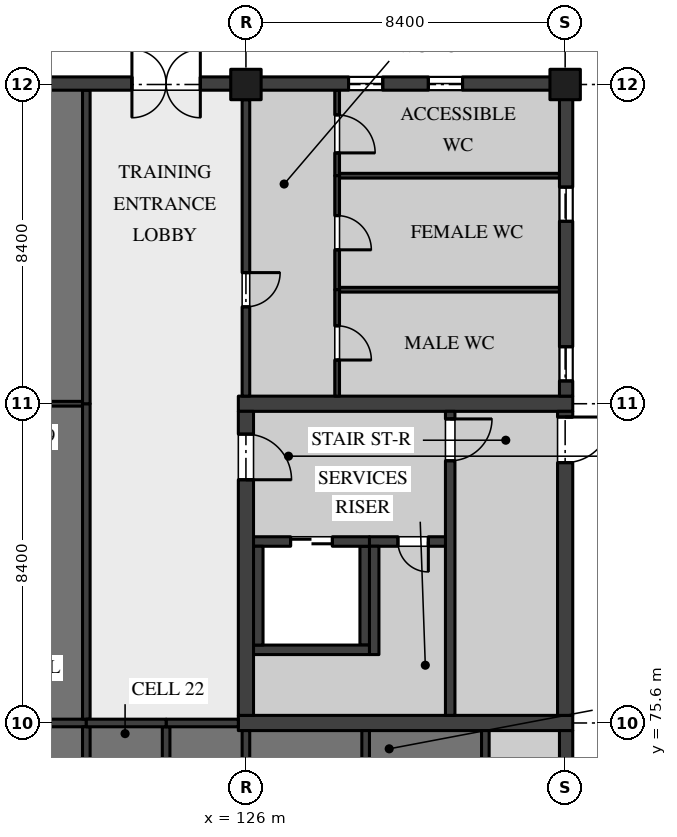
"""IFC4 building model, lengths in metres.
Left out: names, types, materials, properties, quantities, classifications, styles, units other than length and angle.
Written with IfcOpenShell. Run it as: python <this file> out.ifc"""

import sys

from ifc_helpers import new_model, si_unit, direction, frame, frame_2d, origin, origin_2d, place, context, subcontext, project, spatial, rectangle, extrude, element, fill, save


model = new_model("IFC4")
c1 = context("Model", 3, precision=1e-05, world=origin(), true_north=direction((0.0, 1.0)))
c2 = subcontext(c1, "Body", "Model", "MODEL_VIEW")
j1 = project(units=[si_unit("LENGTHUNIT", "METRE"), si_unit("PLANEANGLEUNIT", "RADIAN")], contexts=[c1])
p1 = place(None, origin())
s1 = spatial("IfcSite", under=j1, at=p1, CompositionType="ELEMENT")
p2 = place(p1, origin())
s2 = spatial("IfcBuilding", under=s1, at=p2, CompositionType="ELEMENT")
p3 = place(p2, origin())
s3 = spatial("IfcBuildingStorey", under=s2, at=p3, CompositionType="ELEMENT", Elevation=0.0)
for number, where, z_axis, x_axis in (
    (1, (126.0, 92.4, 0.0), (0.0, 0.0, 1.0), (1.0, 0.0, 0.0)),
    (2, (134.4, 92.4, 0.0), (0.0, 0.0, 1.0), (1.0, 0.0, 0.0)),
):
    element("IfcColumn", number, at=place(p3, frame(where, z_axis=z_axis, x_axis=x_axis)), inside=s3, PredefinedType="COLUMN", context=c2, shape_type="SweptSolid", body=[
        extrude(rectangle(XDim=0.8, YDim=0.8, at=origin_2d()), origin(), (0.0, 0.0, 1.0), 5.05),
    ])
for number, where, z_axis, x_axis in (
    (3, (125.8, 75.6, 0.0), (0.0, 0.0, 1.0), (1.0, 0.0, 0.0)),
    (4, (125.8, 84.0, 0.0), (0.0, 0.0, 1.0), (1.0, 0.0, 0.0)),
):
    element("IfcWall", number, at=place(p3, frame(where, z_axis=z_axis, x_axis=x_axis)), inside=s3, PredefinedType="SHEAR", context=c2, shape_type="SweptSolid", body=[
        extrude(rectangle(XDim=8.8, YDim=0.4, at=frame_2d((4.4, 0.0))), origin(), (0.0, 0.0, 1.0), 5.05),
    ])
p4 = place(p3, frame((126.0, 75.8, 0.0), z_axis=(0.0, 0.0, 1.0), x_axis=(0.0, 1.0, 0.0)))
e5 = element("IfcWall", 5, at=p4, inside=s3, PredefinedType="SHEAR", context=c2, shape_type="SweptSolid", body=[
    extrude(rectangle(XDim=8.0, YDim=0.4, at=frame_2d((4.0, 0.0))), origin(), (0.0, 0.0, 1.0), 5.05),
])
p5 = place(p4, frame((6.2, 0.0, 0.0)))
e6 = element("IfcOpeningElement", 6, at=p5, cuts=e5, PredefinedType="OPENING", context=c2, shape_type="SweptSolid", body=[
    extrude(rectangle(XDim=1.2, YDim=2.1, at=frame_2d((0.6, 1.05))), frame((0.0, 0.21, 0.0), z_axis=(0.0, -1.0, 0.0), x_axis=(1.0, 0.0, 0.0)), (0.0, 0.0, 1.0), 0.42),
])
p6 = place(p3, frame((134.4, 75.8, 0.0), z_axis=(0.0, 0.0, 1.0), x_axis=(0.0, 1.0, 0.0)))
e7 = element("IfcWall", 7, at=p6, inside=s3, PredefinedType="SHEAR", context=c2, shape_type="SweptSolid", body=[
    extrude(rectangle(XDim=8.0, YDim=0.4, at=frame_2d((4.0, 0.0))), origin(), (0.0, 0.0, 1.0), 5.05),
])
p7 = place(p6, frame((6.65, 0.0, 0.0)))
e8 = element("IfcOpeningElement", 8, at=p7, cuts=e7, PredefinedType="OPENING", context=c2, shape_type="SweptSolid", body=[
    extrude(rectangle(XDim=1.2, YDim=2.1, at=frame_2d((0.6, 1.05))), frame((0.0, 0.21, 0.0), z_axis=(0.0, -1.0, 0.0), x_axis=(1.0, 0.0, 0.0)), (0.0, 0.0, 1.0), 0.42),
])
p8 = place(p3, frame((131.375, 83.8, 0.0), z_axis=(0.0, 0.0, 1.0), x_axis=(0.0, -1.0, 0.0)))
e9 = element("IfcWall", 9, at=p8, inside=s3, PredefinedType="SOLIDWALL", context=c2, shape_type="SweptSolid", body=[
    extrude(rectangle(XDim=8.0, YDim=0.25, at=frame_2d((4.0, 0.0))), origin(), (0.0, 0.0, 1.0), 5.05),
])
p9 = place(p8, frame((0.2, 0.0, 0.0)))
e10 = element("IfcOpeningElement", 10, at=p9, cuts=e9, PredefinedType="OPENING", context=c2, shape_type="SweptSolid", body=[
    extrude(rectangle(XDim=1.1, YDim=2.1, at=frame_2d((0.55, 1.05))), frame((0.0, 0.135, 0.0), z_axis=(0.0, -1.0, 0.0), x_axis=(1.0, 0.0, 0.0)), (0.0, 0.0, 1.0), 0.27),
])
p10 = place(p3, frame((131.25, 80.375, 0.0), z_axis=(0.0, 0.0, 1.0), x_axis=(-1.0, 0.0, 0.0)))
e11 = element("IfcWall", 11, at=p10, inside=s3, PredefinedType="SOLIDWALL", context=c2, shape_type="SweptSolid", body=[
    extrude(rectangle(XDim=2.0, YDim=0.25, at=frame_2d((1.0, 0.0))), origin(), (0.0, 0.0, 1.0), 5.05),
])
p11 = place(p10, frame((0.45, 0.0, 0.0)))
e12 = element("IfcOpeningElement", 12, at=p11, cuts=e11, PredefinedType="OPENING", context=c2, shape_type="SweptSolid", body=[
    extrude(rectangle(XDim=0.8, YDim=2.1, at=frame_2d((0.4, 1.05))), frame((0.0, 0.135, 0.0), z_axis=(0.0, -1.0, 0.0), x_axis=(1.0, 0.0, 0.0)), (0.0, 0.0, 1.0), 0.27),
])
p12 = place(p3, frame((129.375, 80.25, 0.0), z_axis=(0.0, 0.0, 1.0), x_axis=(0.0, -1.0, 0.0)))
e13 = element("IfcWall", 13, at=p12, inside=s3, PredefinedType="SOLIDWALL", context=c2, shape_type="SweptSolid", body=[
    extrude(rectangle(XDim=2.85, YDim=0.25, at=frame_2d((1.425, 0.0))), origin(), (0.0, 0.0, 1.0), 5.05),
])
p13 = place(p3, frame((129.125, 77.65, 0.0), z_axis=(0.0, 0.0, 1.0), x_axis=(0.0, 1.0, 0.0)))
e14 = element("IfcWall", 14, at=p13, inside=s3, PredefinedType="SOLIDWALL", context=c2, shape_type="SweptSolid", body=[
    extrude(rectangle(XDim=2.6, YDim=0.25, at=frame_2d((1.3, 0.0))), origin(), (0.0, 0.0, 1.0), 5.05),
])
p14 = place(p3, frame((126.2, 80.375, 0.0), z_axis=(0.0, 0.0, 1.0), x_axis=(1.0, 0.0, 0.0)))
e15 = element("IfcWall", 15, at=p14, inside=s3, PredefinedType="SOLIDWALL", context=c2, shape_type="SweptSolid", body=[
    extrude(rectangle(XDim=3.05, YDim=0.25, at=frame_2d((1.525, 0.0))), origin(), (0.0, 0.0, 1.0), 5.05),
])
p15 = place(p14, frame((0.975, 0.0, 0.0)))
e16 = element("IfcOpeningElement", 16, at=p15, cuts=e15, PredefinedType="OPENING", context=c2, shape_type="SweptSolid", body=[
    extrude(rectangle(XDim=1.1, YDim=2.1, at=frame_2d((0.55, 1.05))), frame((0.0, 0.135, 0.0), z_axis=(0.0, -1.0, 0.0), x_axis=(1.0, 0.0, 0.0)), (0.0, 0.0, 1.0), 0.27),
])
p16 = place(p3, frame((126.2, 77.525, 0.0), z_axis=(0.0, 0.0, 1.0), x_axis=(1.0, 0.0, 0.0)))
e17 = element("IfcWall", 17, at=p16, inside=s3, PredefinedType="SOLIDWALL", context=c2, shape_type="SweptSolid", body=[
    extrude(rectangle(XDim=3.05, YDim=0.25, at=frame_2d((1.525, 0.0))), origin(), (0.0, 0.0, 1.0), 5.05),
])
p17 = place(p3, frame((126.325, 77.65, 0.0), z_axis=(0.0, 0.0, 1.0), x_axis=(0.0, 1.0, 0.0)))
e18 = element("IfcWall", 18, at=p17, inside=s3, PredefinedType="SOLIDWALL", context=c2, shape_type="SweptSolid", body=[
    extrude(rectangle(XDim=2.6, YDim=0.25, at=frame_2d((1.3, 0.0))), origin(), (0.0, 0.0, 1.0), 5.05),
])
p18 = place(p3, frame((119.7, 75.6, 0.0), z_axis=(0.0, 0.0, 1.0), x_axis=(1.0, 0.0, 0.0)))
e19 = element("IfcWall", 19, at=p18, inside=s3, PredefinedType="PARTITIONING", context=c2, shape_type="SweptSolid", body=[
    extrude(rectangle(XDim=2.1, YDim=0.2, at=frame_2d((1.05, 0.0))), origin(), (0.0, 0.0, 1.0), 5.05),
])
p19 = place(p3, frame((118.0, 84.0, 0.0), z_axis=(0.0, 0.0, 1.0), x_axis=(1.0, 0.0, 0.0)))
e20 = element("IfcWall", 20, at=p19, inside=s3, PredefinedType="PARTITIONING", context=c2, shape_type="SweptSolid", body=[
    extrude(rectangle(XDim=3.7, YDim=0.125, at=frame_2d((1.85, 0.0))), origin(), (0.0, 0.0, 1.0), 5.05),
])
p20 = place(p3, frame((121.8, 75.7, 0.0), z_axis=(0.0, 0.0, 1.0), x_axis=(0.0, 1.0, 0.0)))
e21 = element("IfcWall", 21, at=p20, inside=s3, PredefinedType="PARTITIONING", context=c2, shape_type="SweptSolid", body=[
    extrude(rectangle(XDim=8.3, YDim=0.2, at=frame_2d((4.15, 0.0))), origin(), (0.0, 0.0, 1.0), 5.05),
])
p21 = place(p3, frame((123.9, 72.4, 0.0), z_axis=(0.0, 0.0, 1.0), x_axis=(0.0, 1.0, 0.0)))
e22 = element("IfcWall", 22, at=p21, inside=s3, PredefinedType="PARTITIONING", context=c2, shape_type="SweptSolid", body=[
    extrude(rectangle(XDim=3.1, YDim=0.2, at=frame_2d((1.55, 0.0))), origin(), (0.0, 0.0, 1.0), 5.05),
])
p22 = place(p3, frame((126.0, 72.4, 0.0), z_axis=(0.0, 0.0, 1.0), x_axis=(0.0, 1.0, 0.0)))
e23 = element("IfcWall", 23, at=p22, inside=s3, PredefinedType="PARTITIONING", context=c2, shape_type="SweptSolid", body=[
    extrude(rectangle(XDim=3.0, YDim=0.2, at=frame_2d((1.5, 0.0))), origin(), (0.0, 0.0, 1.0), 5.05),
])
p23 = place(p3, frame((123.9, 75.6, 0.0), z_axis=(0.0, 0.0, 1.0), x_axis=(1.0, 0.0, 0.0)))
e24 = element("IfcWall", 24, at=p23, inside=s3, PredefinedType="PARTITIONING", context=c2, shape_type="SweptSolid", body=[
    extrude(rectangle(XDim=1.9, YDim=0.2, at=frame_2d((0.95, 0.0))), origin(), (0.0, 0.0, 1.0), 5.05),
])
p24 = place(p3, frame((121.8, 72.4, 0.0), z_axis=(0.0, 0.0, 1.0), x_axis=(0.0, 1.0, 0.0)))
e25 = element("IfcWall", 25, at=p24, inside=s3, PredefinedType="PARTITIONING", context=c2, shape_type="SweptSolid", body=[
    extrude(rectangle(XDim=3.1, YDim=0.2, at=frame_2d((1.55, 0.0))), origin(), (0.0, 0.0, 1.0), 5.05),
])
p25 = place(p3, frame((121.8, 75.6, 0.0), z_axis=(0.0, 0.0, 1.0), x_axis=(1.0, 0.0, 0.0)))
e26 = element("IfcWall", 26, at=p25, inside=s3, PredefinedType="PARTITIONING", context=c2, shape_type="SweptSolid", body=[
    extrude(rectangle(XDim=2.1, YDim=0.2, at=frame_2d((1.05, 0.0))), origin(), (0.0, 0.0, 1.0), 5.05),
])
for number, where, z_axis, x_axis in (
    (27, (129.15, 72.4, 0.0), (0.0, 0.0, 1.0), (0.0, 1.0, 0.0)),
    (28, (132.3, 72.4, 0.0), (0.0, 0.0, 1.0), (0.0, 1.0, 0.0)),
):
    element("IfcWall", number, at=place(p3, frame(where, z_axis=z_axis, x_axis=x_axis)), inside=s3, PredefinedType="PARTITIONING", context=c2, shape_type="SweptSolid", body=[
        extrude(rectangle(XDim=3.0, YDim=0.2, at=frame_2d((1.5, 0.0))), origin(), (0.0, 0.0, 1.0), 5.05),
    ])
p26 = place(p3, frame((121.8, 84.0, 0.0), z_axis=(0.0, 0.0, 1.0), x_axis=(0.0, 1.0, 0.0)))
e29 = element("IfcWall", 29, at=p26, inside=s3, PredefinedType="PARTITIONING", context=c2, shape_type="SweptSolid", body=[
    extrude(rectangle(XDim=8.25, YDim=0.2, at=frame_2d((4.125, 0.0))), origin(), (0.0, 0.0, 1.0), 5.05),
])
p27 = place(p3, frame((126.0, 84.2, 0.0), z_axis=(0.0, 0.0, 1.0), x_axis=(0.0, 1.0, 0.0)))
e30 = element("IfcWall", 30, at=p27, inside=s3, PredefinedType="PARTITIONING", context=c2, shape_type="SweptSolid", body=[
    extrude(rectangle(XDim=7.8, YDim=0.2, at=frame_2d((3.9, 0.0))), origin(), (0.0, 0.0, 1.0), 5.05),
])
p28 = place(p27, frame((2.35, 0.0, 0.0)))
e31 = element("IfcOpeningElement", 31, at=p28, cuts=e30, PredefinedType="OPENING", context=c2, shape_type="SweptSolid", body=[
    extrude(rectangle(XDim=0.9, YDim=2.1, at=frame_2d((0.45, 1.05))), frame((0.0, 0.11, 0.0), z_axis=(0.0, -1.0, 0.0), x_axis=(1.0, 0.0, 0.0)), (0.0, 0.0, 1.0), 0.22),
])
p29 = place(p3, frame((128.463, 90.0, 0.0), z_axis=(0.0, 0.0, 1.0), x_axis=(1.0, 0.0, 0.0)))
e32 = element("IfcWall", 32, at=p29, inside=s3, PredefinedType="PARTITIONING", context=c2, shape_type="SweptSolid", body=[
    extrude(rectangle(XDim=5.787, YDim=0.125, at=frame_2d((2.894, 0.0))), origin(), (0.0, 0.0, 1.0), 5.05),
])
p30 = place(p3, frame((128.4, 90.0, 0.0), z_axis=(0.0, 0.0, 1.0), x_axis=(0.0, 1.0, 0.0)))
e33 = element("IfcWall", 33, at=p30, inside=s3, PredefinedType="PARTITIONING", context=c2, shape_type="SweptSolid", body=[
    extrude(rectangle(XDim=2.25, YDim=0.125, at=frame_2d((1.125, 0.0))), origin(), (0.0, 0.0, 1.0), 5.05),
])
p31 = place(p30, frame((0.6, 0.0, 0.0)))
e34 = element("IfcOpeningElement", 34, at=p31, cuts=e33, PredefinedType="OPENING", context=c2, shape_type="SweptSolid", body=[
    extrude(rectangle(XDim=1.0, YDim=2.1, at=frame_2d((0.5, 1.05))), frame((0.0, 0.073, 0.0), z_axis=(0.0, -1.0, 0.0), x_axis=(1.0, 0.0, 0.0)), (0.0, 0.0, 1.0), 0.145),
])
p32 = place(p3, frame((128.4, 87.0, 0.0), z_axis=(0.0, 0.0, 1.0), x_axis=(0.0, 1.0, 0.0)))
e35 = element("IfcWall", 35, at=p32, inside=s3, PredefinedType="PARTITIONING", context=c2, shape_type="SweptSolid", body=[
    extrude(rectangle(XDim=3.0, YDim=0.125, at=frame_2d((1.5, 0.0))), origin(), (0.0, 0.0, 1.0), 5.05),
])
p33 = place(p32, frame((1.05, 0.0, 0.0)))
e36 = element("IfcOpeningElement", 36, at=p33, cuts=e35, PredefinedType="OPENING", context=c2, shape_type="SweptSolid", body=[
    extrude(rectangle(XDim=0.9, YDim=2.1, at=frame_2d((0.45, 1.05))), frame((0.0, 0.073, 0.0), z_axis=(0.0, -1.0, 0.0), x_axis=(1.0, 0.0, 0.0)), (0.0, 0.0, 1.0), 0.145),
])
p34 = place(p3, frame((128.463, 87.0, 0.0), z_axis=(0.0, 0.0, 1.0), x_axis=(1.0, 0.0, 0.0)))
e37 = element("IfcWall", 37, at=p34, inside=s3, PredefinedType="PARTITIONING", context=c2, shape_type="SweptSolid", body=[
    extrude(rectangle(XDim=5.787, YDim=0.125, at=frame_2d((2.894, 0.0))), origin(), (0.0, 0.0, 1.0), 5.05),
])
p35 = place(p3, frame((128.4, 84.2, 0.0), z_axis=(0.0, 0.0, 1.0), x_axis=(0.0, 1.0, 0.0)))
e38 = element("IfcWall", 38, at=p35, inside=s3, PredefinedType="PARTITIONING", context=c2, shape_type="SweptSolid", body=[
    extrude(rectangle(XDim=2.8, YDim=0.125, at=frame_2d((1.4, 0.0))), origin(), (0.0, 0.0, 1.0), 5.05),
])
p36 = place(p35, frame((0.95, 0.0, 0.0)))
e39 = element("IfcOpeningElement", 39, at=p36, cuts=e38, PredefinedType="OPENING", context=c2, shape_type="SweptSolid", body=[
    extrude(rectangle(XDim=0.9, YDim=2.1, at=frame_2d((0.45, 1.05))), frame((0.0, 0.073, 0.0), z_axis=(0.0, -1.0, 0.0), x_axis=(1.0, 0.0, 0.0)), (0.0, 0.0, 1.0), 0.145),
])
p37 = place(p3, frame((134.425, 67.58, 0.0), z_axis=(0.0, 0.0, 1.0), x_axis=(0.0, 1.0, 0.0)))
e40 = element("IfcWall", 40, at=p37, inside=s3, PredefinedType="SOLIDWALL", context=c2, shape_type="SweptSolid", body=[
    extrude(rectangle(XDim=7.82, YDim=0.35, at=frame_2d((3.91, 0.0))), origin(), (0.0, 0.0, 1.0), 5.05),
])
p38 = place(p3, frame((134.425, 84.2, 0.0), z_axis=(0.0, 0.0, 1.0), x_axis=(0.0, 1.0, 0.0)))
e41 = element("IfcWall", 41, at=p38, inside=s3, PredefinedType="SOLIDWALL", context=c2, shape_type="SweptSolid", body=[
    extrude(rectangle(XDim=7.82, YDim=0.35, at=frame_2d((3.91, 0.0))), origin(), (0.0, 0.0, 1.0), 5.05),
])
p39 = place(p38, frame((0.4, 0.0, 1.5)))
e42 = element("IfcOpeningElement", 42, at=p39, cuts=e41, PredefinedType="OPENING", context=c2, shape_type="SweptSolid", body=[
    extrude(rectangle(XDim=0.9, YDim=1.2, at=frame_2d((0.45, 0.6))), frame((0.0, 0.185, 0.0), z_axis=(0.0, -1.0, 0.0), x_axis=(1.0, 0.0, 0.0)), (0.0, 0.0, 1.0), 0.37),
])
p40 = place(p38, frame((4.6, 0.0, 1.5)))
e43 = element("IfcOpeningElement", 43, at=p40, cuts=e41, PredefinedType="OPENING", context=c2, shape_type="SweptSolid", body=[
    extrude(rectangle(XDim=0.9, YDim=1.2, at=frame_2d((0.45, 0.6))), frame((0.0, 0.185, 0.0), z_axis=(0.0, -1.0, 0.0), x_axis=(1.0, 0.0, 0.0)), (0.0, 0.0, 1.0), 0.37),
])
p41 = place(p3, frame((134.02, 92.425, 0.0), z_axis=(0.0, 0.0, 1.0), x_axis=(-1.0, 0.0, 0.0)))
e44 = element("IfcWall", 44, at=p41, inside=s3, PredefinedType="SOLIDWALL", context=c2, shape_type="SweptSolid", body=[
    extrude(rectangle(XDim=7.64, YDim=0.35, at=frame_2d((3.82, 0.0))), origin(), (0.0, 0.0, 1.0), 5.05),
])
p42 = place(p41, frame((2.32, 0.0, 1.5)))
e45 = element("IfcOpeningElement", 45, at=p42, cuts=e44, PredefinedType="OPENING", context=c2, shape_type="SweptSolid", body=[
    extrude(rectangle(XDim=0.9, YDim=1.2, at=frame_2d((0.45, 0.6))), frame((0.0, 0.185, 0.0), z_axis=(0.0, -1.0, 0.0), x_axis=(1.0, 0.0, 0.0)), (0.0, 0.0, 1.0), 0.37),
])
p43 = place(p41, frame((4.42, 0.0, 1.5)))
e46 = element("IfcOpeningElement", 46, at=p43, cuts=e44, PredefinedType="OPENING", context=c2, shape_type="SweptSolid", body=[
    extrude(rectangle(XDim=0.9, YDim=1.2, at=frame_2d((0.45, 0.6))), frame((0.0, 0.185, 0.0), z_axis=(0.0, -1.0, 0.0), x_axis=(1.0, 0.0, 0.0)), (0.0, 0.0, 1.0), 0.37),
])
p44 = place(p3, frame((125.62, 92.425, 0.0), z_axis=(0.0, 0.0, 1.0), x_axis=(-1.0, 0.0, 0.0)))
e47 = element("IfcWall", 47, at=p44, inside=s3, PredefinedType="SOLIDWALL", context=c2, shape_type="SweptSolid", body=[
    extrude(rectangle(XDim=7.64, YDim=0.35, at=frame_2d((3.82, 0.0))), origin(), (0.0, 0.0, 1.0), 5.05),
])
p45 = place(p44, frame((0.82, 0.0, 0.0)))
e48 = element("IfcOpeningElement", 48, at=p45, cuts=e47, PredefinedType="OPENING", context=c2, shape_type="SweptSolid", body=[
    extrude(rectangle(XDim=1.8, YDim=2.4, at=frame_2d((0.9, 1.2))), frame((0.0, 0.185, 0.0), z_axis=(0.0, -1.0, 0.0), x_axis=(1.0, 0.0, 0.0)), (0.0, 0.0, 1.0), 0.37),
])
p46 = place(p5, frame((1.2, 0.0, 0.0), z_axis=(0.0, 0.0, 1.0), x_axis=(-1.0, 0.0, 0.0)))
e49 = element("IfcDoor", 49, at=p46, inside=s3, OperationType="SINGLE_SWING_LEFT", PredefinedType="DOOR", context=c2, shape_type="SweptSolid", body=[
    extrude(rectangle(XDim=1.2, YDim=2.1, at=frame_2d((0.6, 1.05))), frame((0.0, 0.035, 0.0), z_axis=(0.0, -1.0, 0.0), x_axis=(1.0, 0.0, 0.0)), (0.0, 0.0, 1.0), 0.07),
])
fill(e6, e49)
p47 = place(p11, origin())
e50 = element("IfcDoor", 50, at=p47, inside=s3, OperationType="SINGLE_SWING_RIGHT", PredefinedType="DOOR", context=c2, shape_type="SweptSolid", body=[
    extrude(rectangle(XDim=0.8, YDim=2.1, at=frame_2d((0.4, 1.05))), frame((0.0, 0.035, 0.0), z_axis=(0.0, -1.0, 0.0), x_axis=(1.0, 0.0, 0.0)), (0.0, 0.0, 1.0), 0.07),
])
fill(e12, e50)
p48 = place(p9, origin())
e51 = element("IfcDoor", 51, at=p48, inside=s3, OperationType="SINGLE_SWING_RIGHT", PredefinedType="DOOR", context=c2, shape_type="SweptSolid", body=[
    extrude(rectangle(XDim=1.1, YDim=2.1, at=frame_2d((0.55, 1.05))), frame((0.0, 0.035, 0.0), z_axis=(0.0, -1.0, 0.0), x_axis=(1.0, 0.0, 0.0)), (0.0, 0.0, 1.0), 0.07),
])
fill(e10, e51)
p49 = place(p7, frame((1.2, 0.0, 0.0), z_axis=(0.0, 0.0, 1.0), x_axis=(-1.0, 0.0, 0.0)))
e52 = element("IfcDoor", 52, at=p49, inside=s3, OperationType="SINGLE_SWING_RIGHT", PredefinedType="DOOR", context=c2, shape_type="SweptSolid", body=[
    extrude(rectangle(XDim=1.2, YDim=2.1, at=frame_2d((0.6, 1.05))), frame((0.0, 0.035, 0.0), z_axis=(0.0, -1.0, 0.0), x_axis=(1.0, 0.0, 0.0)), (0.0, 0.0, 1.0), 0.07),
])
fill(e8, e52)
p50 = place(p15, origin())
e53 = element("IfcDoor", 53, at=p50, inside=s3, OperationType="DOUBLE_DOOR_SLIDING", PredefinedType="DOOR", context=c2, shape_type="SweptSolid", body=[
    extrude(rectangle(XDim=1.1, YDim=2.1, at=frame_2d((0.55, 1.05))), frame((0.0, 0.04, 0.0), z_axis=(0.0, -1.0, 0.0), x_axis=(1.0, 0.0, 0.0)), (0.0, 0.0, 1.0), 0.08),
])
fill(e16, e53)
p51 = place(p31, frame((1.0, 0.0, 0.0), z_axis=(0.0, 0.0, 1.0), x_axis=(-1.0, 0.0, 0.0)))
e54 = element("IfcDoor", 54, at=p51, inside=s3, OperationType="SINGLE_SWING_LEFT", PredefinedType="DOOR", context=c2, shape_type="SweptSolid", body=[
    extrude(rectangle(XDim=1.0, YDim=2.1, at=frame_2d((0.5, 1.05))), frame((0.0, 0.02, 0.0), z_axis=(0.0, -1.0, 0.0), x_axis=(1.0, 0.0, 0.0)), (0.0, 0.0, 1.0), 0.04),
])
fill(e34, e54)
p52 = place(p33, frame((0.9, 0.0, 0.0), z_axis=(0.0, 0.0, 1.0), x_axis=(-1.0, 0.0, 0.0)))
e55 = element("IfcDoor", 55, at=p52, inside=s3, OperationType="SINGLE_SWING_LEFT", PredefinedType="DOOR", context=c2, shape_type="SweptSolid", body=[
    extrude(rectangle(XDim=0.9, YDim=2.1, at=frame_2d((0.45, 1.05))), frame((0.0, 0.02, 0.0), z_axis=(0.0, -1.0, 0.0), x_axis=(1.0, 0.0, 0.0)), (0.0, 0.0, 1.0), 0.04),
])
fill(e36, e55)
p53 = place(p28, frame((0.9, 0.0, 0.0), z_axis=(0.0, 0.0, 1.0), x_axis=(-1.0, 0.0, 0.0)))
e56 = element("IfcDoor", 56, at=p53, inside=s3, OperationType="SINGLE_SWING_RIGHT", PredefinedType="DOOR", context=c2, shape_type="SweptSolid", body=[
    extrude(rectangle(XDim=0.9, YDim=2.1, at=frame_2d((0.45, 1.05))), frame((0.0, 0.03, 0.0), z_axis=(0.0, -1.0, 0.0), x_axis=(1.0, 0.0, 0.0)), (0.0, 0.0, 1.0), 0.06),
])
fill(e31, e56)
p54 = place(p36, frame((0.9, 0.0, 0.0), z_axis=(0.0, 0.0, 1.0), x_axis=(-1.0, 0.0, 0.0)))
e57 = element("IfcDoor", 57, at=p54, inside=s3, OperationType="SINGLE_SWING_LEFT", PredefinedType="DOOR", context=c2, shape_type="SweptSolid", body=[
    extrude(rectangle(XDim=0.9, YDim=2.1, at=frame_2d((0.45, 1.05))), frame((0.0, 0.02, 0.0), z_axis=(0.0, -1.0, 0.0), x_axis=(1.0, 0.0, 0.0)), (0.0, 0.0, 1.0), 0.04),
])
fill(e39, e57)
p55 = place(p39, origin())
e58 = element("IfcWindow", 58, at=p55, inside=s3, PartitioningType="SINGLE_PANEL", PredefinedType="WINDOW", context=c2, shape_type="SweptSolid", body=[
    extrude(rectangle(XDim=0.9, YDim=1.2, at=frame_2d((0.45, 0.6))), frame((0.0, 0.05, 0.0), z_axis=(0.0, -1.0, 0.0), x_axis=(1.0, 0.0, 0.0)), (0.0, 0.0, 1.0), 0.1),
])
fill(e42, e58)
p56 = place(p40, origin())
e59 = element("IfcWindow", 59, at=p56, inside=s3, PartitioningType="SINGLE_PANEL", PredefinedType="WINDOW", context=c2, shape_type="SweptSolid", body=[
    extrude(rectangle(XDim=0.9, YDim=1.2, at=frame_2d((0.45, 0.6))), frame((0.0, 0.05, 0.0), z_axis=(0.0, -1.0, 0.0), x_axis=(1.0, 0.0, 0.0)), (0.0, 0.0, 1.0), 0.1),
])
fill(e43, e59)
p57 = place(p42, origin())
e60 = element("IfcWindow", 60, at=p57, inside=s3, PartitioningType="SINGLE_PANEL", PredefinedType="WINDOW", context=c2, shape_type="SweptSolid", body=[
    extrude(rectangle(XDim=0.9, YDim=1.2, at=frame_2d((0.45, 0.6))), frame((0.0, 0.05, 0.0), z_axis=(0.0, -1.0, 0.0), x_axis=(1.0, 0.0, 0.0)), (0.0, 0.0, 1.0), 0.1),
])
fill(e45, e60)
p58 = place(p43, origin())
e61 = element("IfcWindow", 61, at=p58, inside=s3, PartitioningType="SINGLE_PANEL", PredefinedType="WINDOW", context=c2, shape_type="SweptSolid", body=[
    extrude(rectangle(XDim=0.9, YDim=1.2, at=frame_2d((0.45, 0.6))), frame((0.0, 0.05, 0.0), z_axis=(0.0, -1.0, 0.0), x_axis=(1.0, 0.0, 0.0)), (0.0, 0.0, 1.0), 0.1),
])
fill(e46, e61)
p59 = place(p45, frame((1.8, 0.0, 0.0), z_axis=(0.0, 0.0, 1.0), x_axis=(-1.0, 0.0, 0.0)))
e62 = element("IfcDoor", 62, at=p59, inside=s3, OperationType="DOUBLE_DOOR_DOUBLE_SWING", PredefinedType="DOOR", context=c2, shape_type="SweptSolid", body=[
    extrude(rectangle(XDim=1.8, YDim=2.4, at=frame_2d((0.9, 1.2))), frame((0.0, 0.025, 0.0), z_axis=(0.0, -1.0, 0.0), x_axis=(1.0, 0.0, 0.0)), (0.0, 0.0, 1.0), 0.05),
])
fill(e48, e62)
save(model, sys.argv[1])
